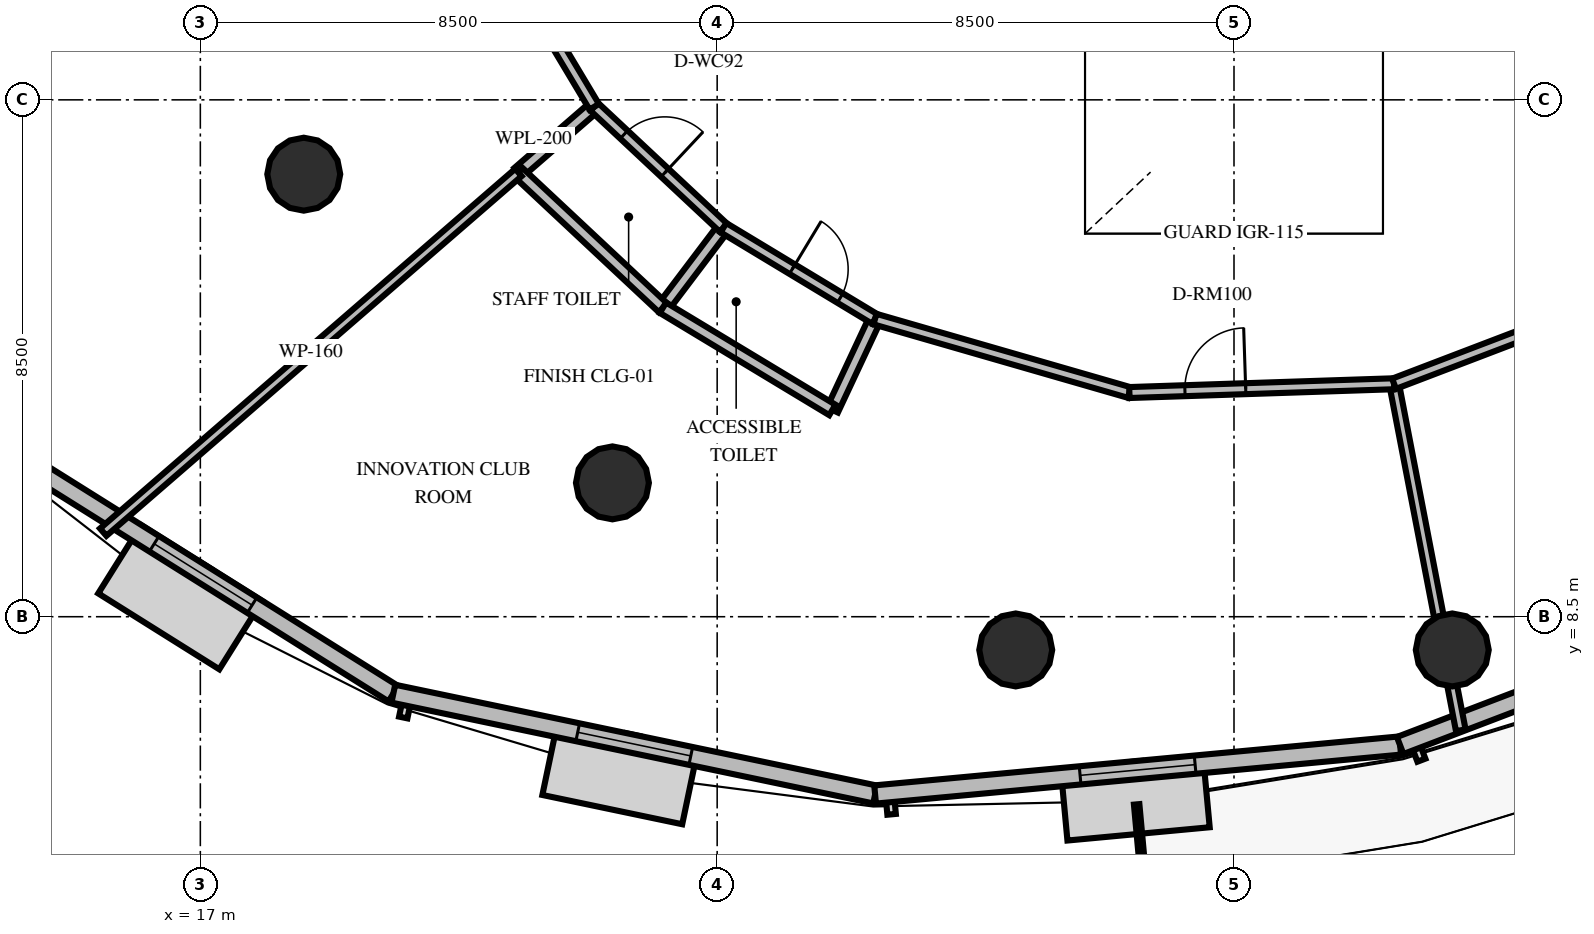
"""IFC4 building model, lengths in metres.
Left out: names, types, materials, properties, quantities, classifications, styles, units other than length and angle.
Written with IfcOpenShell. Run it as: python <this file> out.ifc"""

import sys

from ifc_helpers import new_model, si_unit, direction, frame, frame_2d, origin, origin_2d, place, context, subcontext, project, spatial, rectangle, circle, extrude, element, fill, save


model = new_model("IFC4")
c1 = context("Model", 3, precision=1e-05, world=origin(), true_north=direction((0.0, 1.0)))
c2 = subcontext(c1, "Body", "Model", "MODEL_VIEW")
j1 = project(units=[si_unit("LENGTHUNIT", "METRE"), si_unit("PLANEANGLEUNIT", "RADIAN")], contexts=[c1])
p1 = place(None, origin())
s1 = spatial("IfcSite", under=j1, at=p1, CompositionType="ELEMENT")
p2 = place(p1, origin())
s2 = spatial("IfcBuilding", under=s1, at=p2, CompositionType="ELEMENT")
p3 = place(p2, frame((0.0, 0.0, 121.8)))
s3 = spatial("IfcBuildingStorey", under=s2, at=p3, CompositionType="ELEMENT", Elevation=121.8)
for number, where, z_axis, x_axis in (
    (1, (18.701, 15.778, 0.0), (0.0, 0.0, 1.0), (1.0, 0.0, 0.0)),
    (2, (23.778, 10.701, 0.0), (0.0, 0.0, 1.0), (1.0, 0.0, 0.0)),
    (3, (30.41, 7.954, 0.0), (0.0, 0.0, 1.0), (1.0, 0.0, 0.0)),
    (4, (37.59, 7.954, 0.0), (0.0, 0.0, 1.0), (1.0, 0.0, 0.0)),
):
    element("IfcColumn", number, at=place(p3, frame(where, z_axis=z_axis, x_axis=x_axis)), inside=s3, PredefinedType="COLUMN", context=c2, shape_type="SweptSolid", body=[
        extrude(circle(Radius=0.6, at=origin_2d()), origin(), (0.0, 0.0, 1.0), 4.0),
    ])
p4 = place(p3, frame((13.918, 11.156, 0.0), z_axis=(0.0, 0.0, 1.0), x_axis=(0.847299081662, -0.531116057199, 0.0)))
e5 = element("IfcWall", 5, at=p4, inside=s3, PredefinedType="SOLIDWALL", context=c2, shape_type="SweptSolid", body=[
    extrude(rectangle(XDim=7.383, YDim=0.3, at=frame_2d((3.692, 0.0))), origin(), (0.0, 0.0, 1.0), 2.9),
])
p5 = place(p4, frame((2.742, 0.0, 0.8)))
e6 = element("IfcOpeningElement", 6, at=p5, cuts=e5, PredefinedType="OPENING", context=c2, shape_type="SweptSolid", body=[
    extrude(rectangle(XDim=1.9, YDim=1.95, at=frame_2d((0.95, 0.975))), frame((0.0, 0.16, 0.0), z_axis=(0.0, -1.0, 0.0), x_axis=(1.0, 0.0, 0.0)), (0.0, 0.0, 1.0), 0.32),
])
p6 = place(p3, frame((20.174, 7.234, 0.0), z_axis=(0.0, 0.0, 1.0), x_axis=(0.978800890802, -0.20481410148, 0.0)))
e7 = element("IfcWall", 7, at=p6, inside=s3, PredefinedType="SOLIDWALL", context=c2, shape_type="SweptSolid", body=[
    extrude(rectangle(XDim=8.095, YDim=0.3, at=frame_2d((4.047, 0.0))), origin(), (0.0, 0.0, 1.0), 2.9),
])
p7 = place(p6, frame((3.098, 0.0, 0.8)))
e8 = element("IfcOpeningElement", 8, at=p7, cuts=e7, PredefinedType="OPENING", context=c2, shape_type="SweptSolid", body=[
    extrude(rectangle(XDim=1.9, YDim=1.95, at=frame_2d((0.95, 0.975))), frame((0.0, 0.16, 0.0), z_axis=(0.0, -1.0, 0.0), x_axis=(1.0, 0.0, 0.0)), (0.0, 0.0, 1.0), 0.32),
])
p8 = place(p3, frame((28.097, 5.576, 0.0), z_axis=(0.0, 0.0, 1.0), x_axis=(0.995678666902, 0.092865452549, 0.0)))
e9 = element("IfcWall", 9, at=p8, inside=s3, PredefinedType="SOLIDWALL", context=c2, shape_type="SweptSolid", body=[
    extrude(rectangle(XDim=8.673, YDim=0.3, at=frame_2d((4.336, 0.0))), origin(), (0.0, 0.0, 1.0), 2.9),
])
p9 = place(p8, frame((3.386, 0.0, 0.8)))
e10 = element("IfcOpeningElement", 10, at=p9, cuts=e9, PredefinedType="OPENING", context=c2, shape_type="SweptSolid", body=[
    extrude(rectangle(XDim=1.9, YDim=1.95, at=frame_2d((0.95, 0.975))), frame((0.0, 0.16, 0.0), z_axis=(0.0, -1.0, 0.0), x_axis=(1.0, 0.0, 0.0)), (0.0, 0.0, 1.0), 0.32),
])
p10 = place(p3, frame((36.733, 6.382, 0.0), z_axis=(0.0, 0.0, 1.0), x_axis=(0.934198586352, 0.356753418003, 0.0)))
e11 = element("IfcWall", 11, at=p10, inside=s3, PredefinedType="SOLIDWALL", context=c2, shape_type="SweptSolid", body=[
    extrude(rectangle(XDim=8.891, YDim=0.3, at=frame_2d((4.445, 0.0))), origin(), (0.0, 0.0, 1.0), 2.9),
])
p11 = place(p10, frame((4.43, 0.0, 0.0)))
e12 = element("IfcOpeningElement", 12, at=p11, cuts=e11, PredefinedType="OPENING", context=c2, shape_type="SweptSolid", body=[
    extrude(rectangle(XDim=1.05, YDim=2.15, at=frame_2d((0.525, 1.075))), frame((0.0, 0.16, 0.0), z_axis=(0.0, -1.0, 0.0), x_axis=(1.0, 0.0, 0.0)), (0.0, 0.0, 1.0), 0.32),
])
for number, where, z_axis, x_axis in (
    (13, (23.479, 16.886, 0.0), (0.0, 0.0, 1.0), (-0.756, -0.655, 0.0)),
    (14, (25.603, 14.898, 0.0), (0.0, 0.0, 1.0), (-0.603, -0.798, 0.0)),
):
    element("IfcWall", number, at=place(p3, frame(where, z_axis=z_axis, x_axis=x_axis)), inside=s3, PredefinedType="PLUMBINGWALL", context=c2, shape_type="SweptSolid", body=[
        extrude(rectangle(XDim=1.65, YDim=0.2, at=frame_2d((0.825, 0.0))), origin(), (0.0, 0.0, 1.0), 2.8),
    ])
p12 = place(p3, frame((22.231, 15.806, 0.0), z_axis=(0.0, 0.0, 1.0), x_axis=(0.730156733986, -0.683279696622, 0.0)))
e15 = element("IfcWall", 15, at=p12, inside=s3, PredefinedType="PLUMBINGWALL", context=c2, shape_type="SweptSolid", body=[
    extrude(rectangle(XDim=3.255, YDim=0.2, at=frame_2d((1.627, 0.0))), origin(), (0.0, 0.0, 1.0), 2.8),
])
p13 = place(p3, frame((23.479, 16.886, 0.0), z_axis=(0.0, 0.0, 1.0), x_axis=(0.730167440001, -0.683268255931, 0.0)))
e16 = element("IfcWall", 16, at=p13, inside=s3, PredefinedType="PARTITIONING", context=c2, shape_type="SweptSolid", body=[
    extrude(rectangle(XDim=2.91, YDim=0.18, at=frame_2d((1.455, 0.0))), origin(), (0.0, 0.0, 1.0), 2.8),
])
p14 = place(p13, frame((0.669, 0.0, 0.0)))
e17 = element("IfcOpeningElement", 17, at=p14, cuts=e16, PredefinedType="OPENING", context=c2, shape_type="SweptSolid", body=[
    extrude(rectangle(XDim=0.92, YDim=2.1, at=frame_2d((0.46, 1.05))), frame((0.0, 0.1, 0.0), z_axis=(0.0, -1.0, 0.0), x_axis=(1.0, 0.0, 0.0)), (0.0, 0.0, 1.0), 0.2),
])
p15 = place(p3, frame((28.095, 13.395, 0.0), z_axis=(0.0, 0.0, 1.0), x_axis=(-0.424221569147, -0.905558424548, 0.0)))
e18 = element("IfcWall", 18, at=p15, inside=s3, PredefinedType="PLUMBINGWALL", context=c2, shape_type="SweptSolid", body=[
    extrude(rectangle(XDim=1.65, YDim=0.2, at=frame_2d((0.825, 0.0))), origin(), (0.0, 0.0, 1.0), 2.8),
])
p16 = place(p3, frame((24.608, 13.582, 0.0), z_axis=(0.0, 0.0, 1.0), x_axis=(0.856286042874, -0.516501900073, 0.0)))
e19 = element("IfcWall", 19, at=p16, inside=s3, PredefinedType="PLUMBINGWALL", context=c2, shape_type="SweptSolid", body=[
    extrude(rectangle(XDim=3.255, YDim=0.2, at=frame_2d((1.627, 0.0))), origin(), (0.0, 0.0, 1.0), 2.8),
])
p17 = place(p3, frame((25.603, 14.898, 0.0), z_axis=(0.0, 0.0, 1.0), x_axis=(0.856276585025, -0.516517579504, 0.0)))
e20 = element("IfcWall", 20, at=p17, inside=s3, PredefinedType="PARTITIONING", context=c2, shape_type="SweptSolid", body=[
    extrude(rectangle(XDim=2.91, YDim=0.18, at=frame_2d((1.455, 0.0))), origin(), (0.0, 0.0, 1.0), 2.8),
])
p18 = place(p17, frame((1.321, 0.0, 0.0)))
e21 = element("IfcOpeningElement", 21, at=p18, cuts=e20, PredefinedType="OPENING", context=c2, shape_type="SweptSolid", body=[
    extrude(rectangle(XDim=0.92, YDim=2.1, at=frame_2d((0.46, 1.05))), frame((0.0, 0.1, 0.0), z_axis=(0.0, -1.0, 0.0), x_axis=(1.0, 0.0, 0.0)), (0.0, 0.0, 1.0), 0.2),
])
p19 = place(p3, frame((22.231, 15.806, 0.0), z_axis=(0.0, 0.0, 1.0), x_axis=(-0.755858471294, -0.65473503906, 0.0)))
e22 = element("IfcWall", 22, at=p19, inside=s3, PredefinedType="PARTITIONING", context=c2, shape_type="SweptSolid", body=[
    extrude(rectangle(XDim=9.034, YDim=0.16, at=frame_2d((4.517, 0.0))), origin(), (0.0, 0.0, 1.0), 2.8),
])
p20 = place(p3, frame((36.632, 12.331, 0.0), z_axis=(0.0, 0.0, 1.0), x_axis=(0.18909703684, -0.981958405768, 0.0)))
e23 = element("IfcWall", 23, at=p20, inside=s3, PredefinedType="PARTITIONING", context=c2, shape_type="SweptSolid", body=[
    extrude(rectangle(XDim=5.803, YDim=0.16, at=frame_2d((2.902, 0.0))), origin(), (0.0, 0.0, 1.0), 2.8),
])
p21 = place(p3, frame((28.095, 13.395, 0.0), z_axis=(0.0, 0.0, 1.0), x_axis=(0.960777931748, -0.277318888404, 0.0)))
e24 = element("IfcWall", 24, at=p21, inside=s3, PredefinedType="PARTITIONING", context=c2, shape_type="SweptSolid", body=[
    extrude(rectangle(XDim=4.355, YDim=0.18, at=frame_2d((2.178, 0.0))), origin(), (0.0, 0.0, 1.0), 2.8),
])
p22 = place(p3, frame((32.28, 12.187, 0.0), z_axis=(0.0, 0.0, 1.0), x_axis=(0.999450987856, 0.033131901157, 0.0)))
e25 = element("IfcWall", 25, at=p22, inside=s3, PredefinedType="PARTITIONING", context=c2, shape_type="SweptSolid", body=[
    extrude(rectangle(XDim=4.355, YDim=0.18, at=frame_2d((2.177, 0.0))), origin(), (0.0, 0.0, 1.0), 2.8),
])
p23 = place(p22, frame((0.914, 0.0, 0.0)))
e26 = element("IfcOpeningElement", 26, at=p23, cuts=e25, PredefinedType="OPENING", context=c2, shape_type="SweptSolid", body=[
    extrude(rectangle(XDim=1.0, YDim=2.15, at=frame_2d((0.5, 1.075))), frame((0.0, 0.1, 0.0), z_axis=(0.0, -1.0, 0.0), x_axis=(1.0, 0.0, 0.0)), (0.0, 0.0, 1.0), 0.2),
])
p24 = place(p3, frame((36.632, 12.331, 0.0), z_axis=(0.0, 0.0, 1.0), x_axis=(0.934205840652, 0.356734421232, 0.0)))
e27 = element("IfcWall", 27, at=p24, inside=s3, PredefinedType="PARTITIONING", context=c2, shape_type="SweptSolid", body=[
    extrude(rectangle(XDim=4.834, YDim=0.18, at=frame_2d((2.417, 0.0))), origin(), (0.0, 0.0, 1.0), 2.8),
])
p25 = place(p3, frame((20.996, 21.034, 0.0), z_axis=(0.0, 0.0, 1.0), x_axis=(0.513544831917, -0.858062763212, 0.0)))
e28 = element("IfcWall", 28, at=p25, inside=s3, PredefinedType="PARTITIONING", context=c2, shape_type="SweptSolid", body=[
    extrude(rectangle(XDim=4.834, YDim=0.18, at=frame_2d((2.417, 0.0))), origin(), (0.0, 0.0, 1.0), 2.8),
])
p26 = place(p25, frame((1.034, 0.0, 0.0)))
e29 = element("IfcOpeningElement", 29, at=p26, cuts=e28, PredefinedType="OPENING", context=c2, shape_type="SweptSolid", body=[
    extrude(rectangle(XDim=1.0, YDim=2.15, at=frame_2d((0.5, 1.075))), frame((0.0, 0.1, 0.0), z_axis=(0.0, -1.0, 0.0), x_axis=(1.0, 0.0, 0.0)), (0.0, 0.0, 1.0), 0.2),
])
p27 = place(p5, origin())
e30 = element("IfcWindow", 30, at=p27, inside=s3, PartitioningType="SINGLE_PANEL", PredefinedType="WINDOW", context=c2, shape_type="SweptSolid", body=[
    extrude(rectangle(XDim=1.9, YDim=1.95, at=frame_2d((0.95, 0.975))), frame((0.0, 0.03, 0.0), z_axis=(0.0, -1.0, 0.0), x_axis=(1.0, 0.0, 0.0)), (0.0, 0.0, 1.0), 0.06),
])
fill(e6, e30)
p28 = place(p7, origin())
e31 = element("IfcWindow", 31, at=p28, inside=s3, PartitioningType="SINGLE_PANEL", PredefinedType="WINDOW", context=c2, shape_type="SweptSolid", body=[
    extrude(rectangle(XDim=1.9, YDim=1.95, at=frame_2d((0.95, 0.975))), frame((0.0, 0.03, 0.0), z_axis=(0.0, -1.0, 0.0), x_axis=(1.0, 0.0, 0.0)), (0.0, 0.0, 1.0), 0.06),
])
fill(e8, e31)
p29 = place(p9, origin())
e32 = element("IfcWindow", 32, at=p29, inside=s3, PartitioningType="SINGLE_PANEL", PredefinedType="WINDOW", context=c2, shape_type="SweptSolid", body=[
    extrude(rectangle(XDim=1.9, YDim=1.95, at=frame_2d((0.95, 0.975))), frame((0.0, 0.03, 0.0), z_axis=(0.0, -1.0, 0.0), x_axis=(1.0, 0.0, 0.0)), (0.0, 0.0, 1.0), 0.06),
])
fill(e10, e32)
p30 = place(p14, origin())
e33 = element("IfcDoor", 33, at=p30, inside=s3, OperationType="SINGLE_SWING_RIGHT", PredefinedType="DOOR", context=c2, shape_type="SweptSolid", body=[
    extrude(rectangle(XDim=0.92, YDim=2.1, at=frame_2d((0.46, 1.05))), frame((0.0, 0.025, 0.0), z_axis=(0.0, -1.0, 0.0), x_axis=(1.0, 0.0, 0.0)), (0.0, 0.0, 1.0), 0.05),
])
fill(e17, e33)
p31 = place(p18, origin())
e34 = element("IfcDoor", 34, at=p31, inside=s3, OperationType="SINGLE_SWING_LEFT", PredefinedType="DOOR", context=c2, shape_type="SweptSolid", body=[
    extrude(rectangle(XDim=0.92, YDim=2.1, at=frame_2d((0.46, 1.05))), frame((0.0, 0.025, 0.0), z_axis=(0.0, -1.0, 0.0), x_axis=(1.0, 0.0, 0.0)), (0.0, 0.0, 1.0), 0.05),
])
fill(e21, e34)
p32 = place(p23, origin())
e35 = element("IfcDoor", 35, at=p32, inside=s3, OperationType="SINGLE_SWING_RIGHT", PredefinedType="DOOR", context=c2, shape_type="SweptSolid", body=[
    extrude(rectangle(XDim=1.0, YDim=2.15, at=frame_2d((0.5, 1.075))), frame((0.0, 0.025, 0.0), z_axis=(0.0, -1.0, 0.0), x_axis=(1.0, 0.0, 0.0)), (0.0, 0.0, 1.0), 0.05),
])
fill(e26, e35)
save(model, sys.argv[1])
